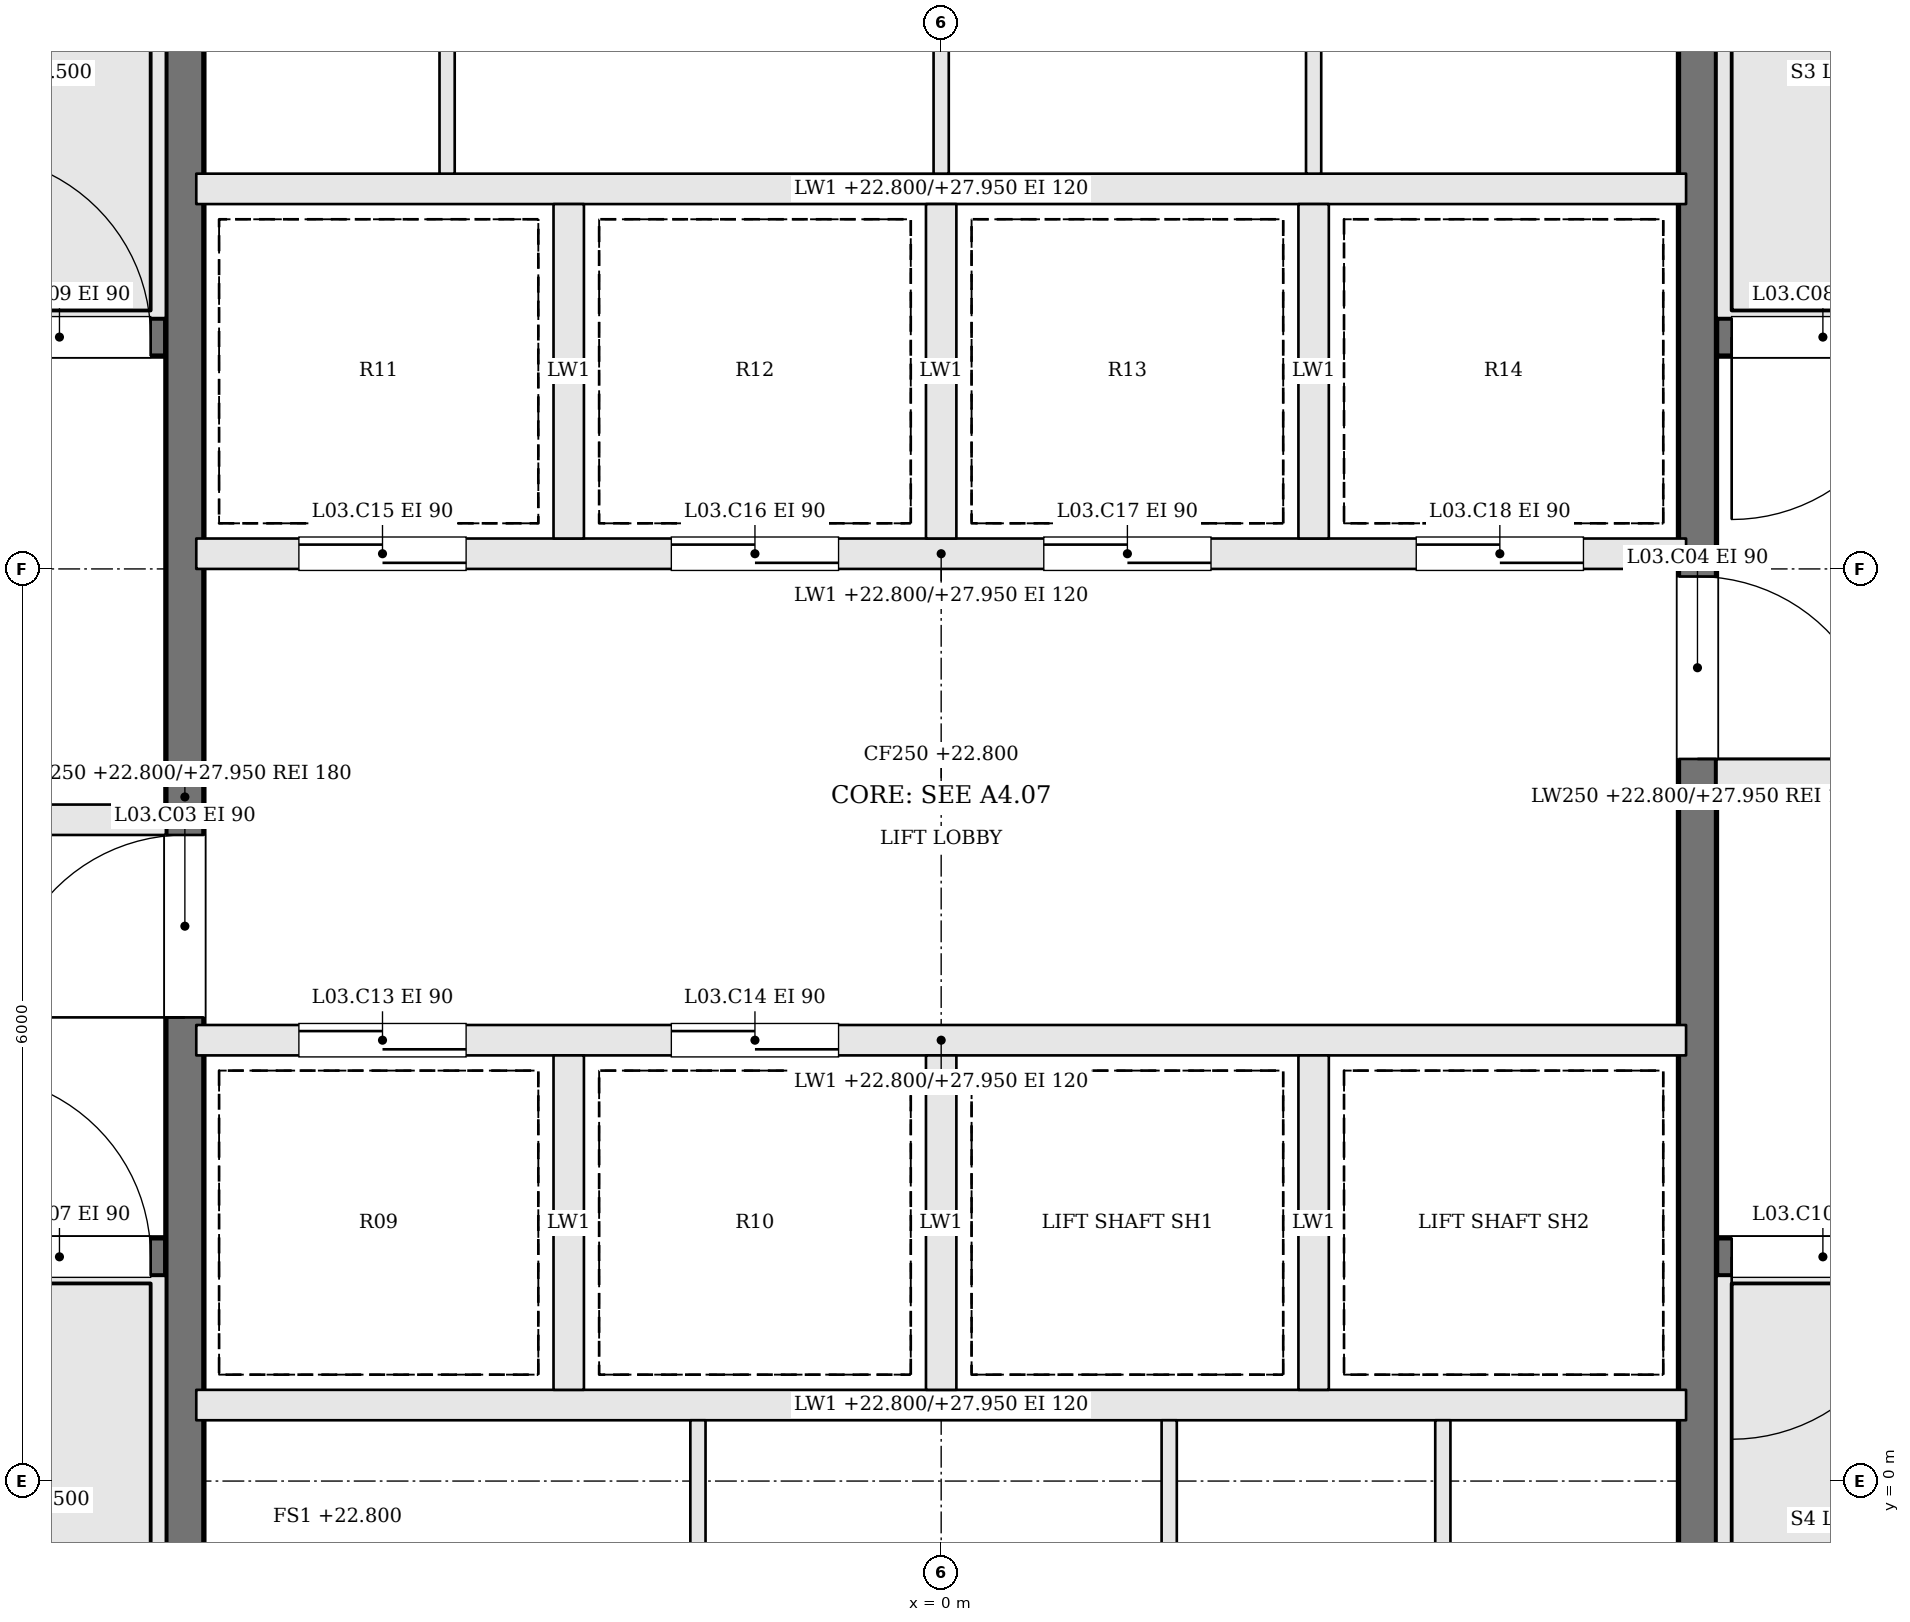
"""IFC4 building model, lengths in metres.
Left out: names, types, materials, properties, quantities, classifications, styles, units other than length and angle.
Written with IfcOpenShell. Run it as: python <this file> out.ifc"""

import sys

from ifc_helpers import new_model, si_unit, direction, frame, frame_2d, origin, place, context, subcontext, project, spatial, rectangle, extrude, element, fill, save


model = new_model("IFC4")
c1 = context("Model", 3, precision=1e-05, world=origin(), true_north=direction((0.0, 1.0)))
c2 = subcontext(c1, "Body", "Model", "MODEL_VIEW")
j1 = project(units=[si_unit("LENGTHUNIT", "METRE"), si_unit("PLANEANGLEUNIT", "RADIAN")], contexts=[c1])
p1 = place(None, origin())
s1 = spatial("IfcSite", under=j1, at=p1, CompositionType="ELEMENT")
p2 = place(p1, origin())
s2 = spatial("IfcBuilding", under=s1, at=p2, CompositionType="ELEMENT")
p3 = place(p2, frame((0.0, 0.0, 22.8)))
s3 = spatial("IfcBuildingStorey", under=s2, at=p3, CompositionType="ELEMENT", Elevation=22.8)
p4 = place(p3, frame((-11.6, 1.475, 0.0), z_axis=(0.0, 0.0, 1.0), x_axis=(1.0, 0.0, 0.0)))
e1 = element("IfcWall", 1, at=p4, inside=s3, PredefinedType="SOLIDWALL", context=c2, shape_type="SweptSolid", body=[
    extrude(rectangle(XDim=6.5, YDim=0.25, at=frame_2d((3.25, 0.0))), origin(), (0.0, 0.0, 1.0), 5.15),
])
p5 = place(p4, frame((5.2, 0.0, 0.0)))
e2 = element("IfcOpeningElement", 2, at=p5, cuts=e1, PredefinedType="OPENING", context=c2, shape_type="SweptSolid", body=[
    extrude(rectangle(XDim=1.2, YDim=2.1, at=frame_2d((0.6, 1.05))), frame((0.0, 0.135, 0.0), z_axis=(0.0, -1.0, 0.0), x_axis=(1.0, 0.0, 0.0)), (0.0, 0.0, 1.0), 0.27),
])
p6 = place(p3, frame((11.6, 7.525, 0.0), z_axis=(0.0, 0.0, 1.0), x_axis=(-1.0, 0.0, 0.0)))
e3 = element("IfcWall", 3, at=p6, inside=s3, PredefinedType="SOLIDWALL", context=c2, shape_type="SweptSolid", body=[
    extrude(rectangle(XDim=6.5, YDim=0.25, at=frame_2d((3.25, 0.0))), origin(), (0.0, 0.0, 1.0), 5.15),
])
p7 = place(p6, frame((5.2, 0.0, 0.0)))
e4 = element("IfcOpeningElement", 4, at=p7, cuts=e3, PredefinedType="OPENING", context=c2, shape_type="SweptSolid", body=[
    extrude(rectangle(XDim=1.2, YDim=2.1, at=frame_2d((0.6, 1.05))), frame((0.0, 0.135, 0.0), z_axis=(0.0, -1.0, 0.0), x_axis=(1.0, 0.0, 0.0)), (0.0, 0.0, 1.0), 0.27),
])
p8 = place(p3, frame((-11.6, 4.35, 0.0), z_axis=(0.0, 0.0, 1.0), x_axis=(1.0, 0.0, 0.0)))
e5 = element("IfcWall", 5, at=p8, inside=s3, PredefinedType="SOLIDWALL", context=c2, shape_type="SweptSolid", body=[
    extrude(rectangle(XDim=6.5, YDim=0.2, at=frame_2d((3.25, 0.0))), origin(), (0.0, 0.0, 1.0), 5.15),
])
p9 = place(p8, frame((3.8, 0.0, 0.0)))
e6 = element("IfcOpeningElement", 6, at=p9, cuts=e5, PredefinedType="OPENING", context=c2, shape_type="SweptSolid", body=[
    extrude(rectangle(XDim=1.2, YDim=2.1, at=frame_2d((0.6, 1.05))), frame((0.0, 0.11, 0.0), z_axis=(0.0, -1.0, 0.0), x_axis=(1.0, 0.0, 0.0)), (0.0, 0.0, 1.0), 0.22),
])
p10 = place(p8, frame((0.5, 0.0, 0.0)))
e7 = element("IfcOpeningElement", 7, at=p10, cuts=e5, PredefinedType="OPENING", context=c2, shape_type="SweptSolid", body=[
    extrude(rectangle(XDim=1.2, YDim=2.1, at=frame_2d((0.6, 1.05))), frame((0.0, 0.11, 0.0), z_axis=(0.0, -1.0, 0.0), x_axis=(1.0, 0.0, 0.0)), (0.0, 0.0, 1.0), 0.22),
])
p11 = place(p3, frame((11.6, 4.65, 0.0), z_axis=(0.0, 0.0, 1.0), x_axis=(-1.0, 0.0, 0.0)))
e8 = element("IfcWall", 8, at=p11, inside=s3, PredefinedType="SOLIDWALL", context=c2, shape_type="SweptSolid", body=[
    extrude(rectangle(XDim=6.5, YDim=0.2, at=frame_2d((3.25, 0.0))), origin(), (0.0, 0.0, 1.0), 5.15),
])
p12 = place(p11, frame((3.8, 0.0, 0.0)))
e9 = element("IfcOpeningElement", 9, at=p12, cuts=e8, PredefinedType="OPENING", context=c2, shape_type="SweptSolid", body=[
    extrude(rectangle(XDim=1.2, YDim=2.1, at=frame_2d((0.6, 1.05))), frame((0.0, 0.11, 0.0), z_axis=(0.0, -1.0, 0.0), x_axis=(1.0, 0.0, 0.0)), (0.0, 0.0, 1.0), 0.22),
])
p13 = place(p11, frame((0.5, 0.0, 0.0)))
e10 = element("IfcOpeningElement", 10, at=p13, cuts=e8, PredefinedType="OPENING", context=c2, shape_type="SweptSolid", body=[
    extrude(rectangle(XDim=1.2, YDim=2.1, at=frame_2d((0.6, 1.05))), frame((0.0, 0.11, 0.0), z_axis=(0.0, -1.0, 0.0), x_axis=(1.0, 0.0, 0.0)), (0.0, 0.0, 1.0), 0.22),
])
p14 = place(p3, frame((-11.6, 7.525, 0.0), z_axis=(0.0, 0.0, 1.0), x_axis=(1.0, 0.0, 0.0)))
e11 = element("IfcWall", 11, at=p14, inside=s3, PredefinedType="SOLIDWALL", context=c2, shape_type="SweptSolid", body=[
    extrude(rectangle(XDim=6.5, YDim=0.25, at=frame_2d((3.25, 0.0))), origin(), (0.0, 0.0, 1.0), 5.15),
])
p15 = place(p14, frame((5.2, 0.0, 0.0)))
e12 = element("IfcOpeningElement", 12, at=p15, cuts=e11, PredefinedType="OPENING", context=c2, shape_type="SweptSolid", body=[
    extrude(rectangle(XDim=1.2, YDim=2.1, at=frame_2d((0.6, 1.05))), frame((0.0, 0.135, 0.0), z_axis=(0.0, -1.0, 0.0), x_axis=(1.0, 0.0, 0.0)), (0.0, 0.0, 1.0), 0.27),
])
p16 = place(p3, frame((11.6, 1.475, 0.0), z_axis=(0.0, 0.0, 1.0), x_axis=(-1.0, 0.0, 0.0)))
e13 = element("IfcWall", 13, at=p16, inside=s3, PredefinedType="SOLIDWALL", context=c2, shape_type="SweptSolid", body=[
    extrude(rectangle(XDim=6.5, YDim=0.25, at=frame_2d((3.25, 0.0))), origin(), (0.0, 0.0, 1.0), 5.15),
])
p17 = place(p16, frame((5.2, 0.0, 0.0)))
e14 = element("IfcOpeningElement", 14, at=p17, cuts=e13, PredefinedType="OPENING", context=c2, shape_type="SweptSolid", body=[
    extrude(rectangle(XDim=1.2, YDim=2.1, at=frame_2d((0.6, 1.05))), frame((0.0, 0.135, 0.0), z_axis=(0.0, -1.0, 0.0), x_axis=(1.0, 0.0, 0.0)), (0.0, 0.0, 1.0), 0.27),
])
p18 = place(p3, frame((-4.975, -1.6, 0.0), z_axis=(0.0, 0.0, 1.0), x_axis=(0.0, 1.0, 0.0)))
e15 = element("IfcWall", 15, at=p18, inside=s3, PredefinedType="SOLIDWALL", context=c2, shape_type="SweptSolid", body=[
    extrude(rectangle(XDim=12.2, YDim=0.25, at=frame_2d((6.1, 0.0))), origin(), (0.0, 0.0, 1.0), 5.15),
])
p19 = place(p18, frame((4.65, 0.0, 0.0)))
e16 = element("IfcOpeningElement", 16, at=p19, cuts=e15, PredefinedType="OPENING", context=c2, shape_type="SweptSolid", body=[
    extrude(rectangle(XDim=1.2, YDim=2.1, at=frame_2d((0.6, 1.05))), frame((0.0, 0.135, 0.0), z_axis=(0.0, -1.0, 0.0), x_axis=(1.0, 0.0, 0.0)), (0.0, 0.0, 1.0), 0.27),
])
p20 = place(p3, frame((4.975, 10.6, 0.0), z_axis=(0.0, 0.0, 1.0), x_axis=(0.0, -1.0, 0.0)))
e17 = element("IfcWall", 17, at=p20, inside=s3, PredefinedType="SOLIDWALL", context=c2, shape_type="SweptSolid", body=[
    extrude(rectangle(XDim=12.2, YDim=0.25, at=frame_2d((6.1, 0.0))), origin(), (0.0, 0.0, 1.0), 5.15),
])
p21 = place(p20, frame((4.65, 0.0, 0.0)))
e18 = element("IfcOpeningElement", 18, at=p21, cuts=e17, PredefinedType="OPENING", context=c2, shape_type="SweptSolid", body=[
    extrude(rectangle(XDim=1.2, YDim=2.1, at=frame_2d((0.6, 1.05))), frame((0.0, 0.135, 0.0), z_axis=(0.0, -1.0, 0.0), x_axis=(1.0, 0.0, 0.0)), (0.0, 0.0, 1.0), 0.27),
])
p22 = place(p3, frame((-4.9, 0.5, 0.0), z_axis=(0.0, 0.0, 1.0), x_axis=(1.0, 0.0, 0.0)))
e19 = element("IfcWall", 19, at=p22, inside=s3, PredefinedType="SOLIDWALL", context=c2, shape_type="SweptSolid", body=[
    extrude(rectangle(XDim=9.8, YDim=0.2, at=frame_2d((4.9, 0.0))), origin(), (0.0, 0.0, 1.0), 5.15),
])
p23 = place(p3, frame((-4.9, 2.9, 0.0), z_axis=(0.0, 0.0, 1.0), x_axis=(1.0, 0.0, 0.0)))
e20 = element("IfcWall", 20, at=p23, inside=s3, PredefinedType="SOLIDWALL", context=c2, shape_type="SweptSolid", body=[
    extrude(rectangle(XDim=9.8, YDim=0.2, at=frame_2d((4.9, 0.0))), origin(), (0.0, 0.0, 1.0), 5.15),
])
p24 = place(p23, frame((0.675, 0.0, 0.0)))
e21 = element("IfcOpeningElement", 21, at=p24, cuts=e20, PredefinedType="OPENING", context=c2, shape_type="SweptSolid", body=[
    extrude(rectangle(XDim=1.1, YDim=2.1, at=frame_2d((0.55, 1.05))), frame((0.0, 0.11, 0.0), z_axis=(0.0, -1.0, 0.0), x_axis=(1.0, 0.0, 0.0)), (0.0, 0.0, 1.0), 0.22),
])
p25 = place(p23, frame((3.125, 0.0, 0.0)))
e22 = element("IfcOpeningElement", 22, at=p25, cuts=e20, PredefinedType="OPENING", context=c2, shape_type="SweptSolid", body=[
    extrude(rectangle(XDim=1.1, YDim=2.1, at=frame_2d((0.55, 1.05))), frame((0.0, 0.11, 0.0), z_axis=(0.0, -1.0, 0.0), x_axis=(1.0, 0.0, 0.0)), (0.0, 0.0, 1.0), 0.22),
])
p26 = place(p3, frame((-4.9, 6.1, 0.0), z_axis=(0.0, 0.0, 1.0), x_axis=(1.0, 0.0, 0.0)))
e23 = element("IfcWall", 23, at=p26, inside=s3, PredefinedType="SOLIDWALL", context=c2, shape_type="SweptSolid", body=[
    extrude(rectangle(XDim=9.8, YDim=0.2, at=frame_2d((4.9, 0.0))), origin(), (0.0, 0.0, 1.0), 5.15),
])
p27 = place(p26, frame((0.675, 0.0, 0.0)))
e24 = element("IfcOpeningElement", 24, at=p27, cuts=e23, PredefinedType="OPENING", context=c2, shape_type="SweptSolid", body=[
    extrude(rectangle(XDim=1.1, YDim=2.1, at=frame_2d((0.55, 1.05))), frame((0.0, 0.11, 0.0), z_axis=(0.0, -1.0, 0.0), x_axis=(1.0, 0.0, 0.0)), (0.0, 0.0, 1.0), 0.22),
])
p28 = place(p26, frame((3.125, 0.0, 0.0)))
e25 = element("IfcOpeningElement", 25, at=p28, cuts=e23, PredefinedType="OPENING", context=c2, shape_type="SweptSolid", body=[
    extrude(rectangle(XDim=1.1, YDim=2.1, at=frame_2d((0.55, 1.05))), frame((0.0, 0.11, 0.0), z_axis=(0.0, -1.0, 0.0), x_axis=(1.0, 0.0, 0.0)), (0.0, 0.0, 1.0), 0.22),
])
p29 = place(p26, frame((5.575, 0.0, 0.0)))
e26 = element("IfcOpeningElement", 26, at=p29, cuts=e23, PredefinedType="OPENING", context=c2, shape_type="SweptSolid", body=[
    extrude(rectangle(XDim=1.1, YDim=2.1, at=frame_2d((0.55, 1.05))), frame((0.0, 0.11, 0.0), z_axis=(0.0, -1.0, 0.0), x_axis=(1.0, 0.0, 0.0)), (0.0, 0.0, 1.0), 0.22),
])
p30 = place(p26, frame((8.025, 0.0, 0.0)))
e27 = element("IfcOpeningElement", 27, at=p30, cuts=e23, PredefinedType="OPENING", context=c2, shape_type="SweptSolid", body=[
    extrude(rectangle(XDim=1.1, YDim=2.1, at=frame_2d((0.55, 1.05))), frame((0.0, 0.11, 0.0), z_axis=(0.0, -1.0, 0.0), x_axis=(1.0, 0.0, 0.0)), (0.0, 0.0, 1.0), 0.22),
])
p31 = place(p3, frame((-4.9, 8.5, 0.0), z_axis=(0.0, 0.0, 1.0), x_axis=(1.0, 0.0, 0.0)))
e28 = element("IfcWall", 28, at=p31, inside=s3, PredefinedType="SOLIDWALL", context=c2, shape_type="SweptSolid", body=[
    extrude(rectangle(XDim=9.8, YDim=0.2, at=frame_2d((4.9, 0.0))), origin(), (0.0, 0.0, 1.0), 5.15),
])
for number, where, z_axis, x_axis in (
    (29, (-2.45, 0.6, 0.0), (0.0, 0.0, 1.0), (0.0, 1.0, 0.0)),
    (30, (0.0, 0.6, 0.0), (0.0, 0.0, 1.0), (0.0, 1.0, 0.0)),
    (31, (2.45, 0.6, 0.0), (0.0, 0.0, 1.0), (0.0, 1.0, 0.0)),
    (32, (-2.45, 6.2, 0.0), (0.0, 0.0, 1.0), (0.0, 1.0, 0.0)),
    (33, (0.0, 6.2, 0.0), (0.0, 0.0, 1.0), (0.0, 1.0, 0.0)),
    (34, (2.45, 6.2, 0.0), (0.0, 0.0, 1.0), (0.0, 1.0, 0.0)),
):
    element("IfcWall", number, at=place(p3, frame(where, z_axis=z_axis, x_axis=x_axis)), inside=s3, PredefinedType="SOLIDWALL", context=c2, shape_type="SweptSolid", body=[
        extrude(rectangle(XDim=2.2, YDim=0.2, at=frame_2d((1.1, 0.0))), origin(), (0.0, 0.0, 1.0), 5.15),
    ])
for number, where, z_axis, x_axis in (
    (35, (-1.6, -1.6, 0.0), (0.0, 0.0, 1.0), (0.0, 1.0, 0.0)),
    (36, (1.5, -1.6, 0.0), (0.0, 0.0, 1.0), (0.0, 1.0, 0.0)),
    (37, (3.3, -1.6, 0.0), (0.0, 0.0, 1.0), (0.0, 1.0, 0.0)),
    (38, (-3.25, 8.6, 0.0), (0.0, 0.0, 1.0), (0.0, 1.0, 0.0)),
    (39, (0.0, 8.6, 0.0), (0.0, 0.0, 1.0), (0.0, 1.0, 0.0)),
    (40, (2.45, 8.6, 0.0), (0.0, 0.0, 1.0), (0.0, 1.0, 0.0)),
):
    element("IfcWall", number, at=place(p3, frame(where, z_axis=z_axis, x_axis=x_axis)), inside=s3, PredefinedType="PARTITIONING", context=c2, shape_type="SweptSolid", body=[
        extrude(rectangle(XDim=2.0, YDim=0.1, at=frame_2d((1.0, 0.0))), origin(), (0.0, 0.0, 1.0), 5.15),
    ])
p32 = place(p19, origin())
e41 = element("IfcDoor", 41, at=p32, inside=s3, OperationType="SINGLE_SWING_LEFT", PredefinedType="DOOR", context=c2, shape_type="SweptSolid", body=[
    extrude(rectangle(XDim=1.2, YDim=2.1, at=frame_2d((0.6, 1.05))), frame((0.0, 0.025, 0.0), z_axis=(0.0, -1.0, 0.0), x_axis=(1.0, 0.0, 0.0)), (0.0, 0.0, 1.0), 0.05),
])
fill(e16, e41)
p33 = place(p21, origin())
e42 = element("IfcDoor", 42, at=p33, inside=s3, OperationType="SINGLE_SWING_RIGHT", PredefinedType="DOOR", context=c2, shape_type="SweptSolid", body=[
    extrude(rectangle(XDim=1.2, YDim=2.1, at=frame_2d((0.6, 1.05))), frame((0.0, 0.025, 0.0), z_axis=(0.0, -1.0, 0.0), x_axis=(1.0, 0.0, 0.0)), (0.0, 0.0, 1.0), 0.05),
])
fill(e18, e42)
p34 = place(p5, origin())
e43 = element("IfcDoor", 43, at=p34, inside=s3, OperationType="SINGLE_SWING_LEFT", PredefinedType="DOOR", context=c2, shape_type="SweptSolid", body=[
    extrude(rectangle(XDim=1.2, YDim=2.1, at=frame_2d((0.6, 1.05))), frame((0.0, 0.025, 0.0), z_axis=(0.0, -1.0, 0.0), x_axis=(1.0, 0.0, 0.0)), (0.0, 0.0, 1.0), 0.05),
])
fill(e2, e43)
p35 = place(p7, origin())
e44 = element("IfcDoor", 44, at=p35, inside=s3, OperationType="SINGLE_SWING_RIGHT", PredefinedType="DOOR", context=c2, shape_type="SweptSolid", body=[
    extrude(rectangle(XDim=1.2, YDim=2.1, at=frame_2d((0.6, 1.05))), frame((0.0, 0.025, 0.0), z_axis=(0.0, -1.0, 0.0), x_axis=(1.0, 0.0, 0.0)), (0.0, 0.0, 1.0), 0.05),
])
fill(e4, e44)
p36 = place(p15, origin())
e45 = element("IfcDoor", 45, at=p36, inside=s3, OperationType="SINGLE_SWING_LEFT", PredefinedType="DOOR", context=c2, shape_type="SweptSolid", body=[
    extrude(rectangle(XDim=1.2, YDim=2.1, at=frame_2d((0.6, 1.05))), frame((0.0, 0.025, 0.0), z_axis=(0.0, -1.0, 0.0), x_axis=(1.0, 0.0, 0.0)), (0.0, 0.0, 1.0), 0.05),
])
fill(e12, e45)
p37 = place(p17, origin())
e46 = element("IfcDoor", 46, at=p37, inside=s3, OperationType="SINGLE_SWING_RIGHT", PredefinedType="DOOR", context=c2, shape_type="SweptSolid", body=[
    extrude(rectangle(XDim=1.2, YDim=2.1, at=frame_2d((0.6, 1.05))), frame((0.0, 0.025, 0.0), z_axis=(0.0, -1.0, 0.0), x_axis=(1.0, 0.0, 0.0)), (0.0, 0.0, 1.0), 0.05),
])
fill(e14, e46)
p38 = place(p24, origin())
e47 = element("IfcDoor", 47, at=p38, inside=s3, OperationType="SLIDING_TO_RIGHT", PredefinedType="DOOR", context=c2, shape_type="SweptSolid", body=[
    extrude(rectangle(XDim=1.1, YDim=2.1, at=frame_2d((0.55, 1.05))), frame((0.0, 0.025, 0.0), z_axis=(0.0, -1.0, 0.0), x_axis=(1.0, 0.0, 0.0)), (0.0, 0.0, 1.0), 0.05),
])
fill(e21, e47)
p39 = place(p25, origin())
e48 = element("IfcDoor", 48, at=p39, inside=s3, OperationType="SLIDING_TO_LEFT", PredefinedType="DOOR", context=c2, shape_type="SweptSolid", body=[
    extrude(rectangle(XDim=1.1, YDim=2.1, at=frame_2d((0.55, 1.05))), frame((0.0, 0.025, 0.0), z_axis=(0.0, -1.0, 0.0), x_axis=(1.0, 0.0, 0.0)), (0.0, 0.0, 1.0), 0.05),
])
fill(e22, e48)
p40 = place(p27, origin())
e49 = element("IfcDoor", 49, at=p40, inside=s3, OperationType="SLIDING_TO_RIGHT", PredefinedType="DOOR", context=c2, shape_type="SweptSolid", body=[
    extrude(rectangle(XDim=1.1, YDim=2.1, at=frame_2d((0.55, 1.05))), frame((0.0, 0.025, 0.0), z_axis=(0.0, -1.0, 0.0), x_axis=(1.0, 0.0, 0.0)), (0.0, 0.0, 1.0), 0.05),
])
fill(e24, e49)
p41 = place(p28, origin())
e50 = element("IfcDoor", 50, at=p41, inside=s3, OperationType="SLIDING_TO_LEFT", PredefinedType="DOOR", context=c2, shape_type="SweptSolid", body=[
    extrude(rectangle(XDim=1.1, YDim=2.1, at=frame_2d((0.55, 1.05))), frame((0.0, 0.025, 0.0), z_axis=(0.0, -1.0, 0.0), x_axis=(1.0, 0.0, 0.0)), (0.0, 0.0, 1.0), 0.05),
])
fill(e25, e50)
p42 = place(p29, origin())
e51 = element("IfcDoor", 51, at=p42, inside=s3, OperationType="SLIDING_TO_RIGHT", PredefinedType="DOOR", context=c2, shape_type="SweptSolid", body=[
    extrude(rectangle(XDim=1.1, YDim=2.1, at=frame_2d((0.55, 1.05))), frame((0.0, 0.025, 0.0), z_axis=(0.0, -1.0, 0.0), x_axis=(1.0, 0.0, 0.0)), (0.0, 0.0, 1.0), 0.05),
])
fill(e26, e51)
p43 = place(p30, origin())
e52 = element("IfcDoor", 52, at=p43, inside=s3, OperationType="SLIDING_TO_LEFT", PredefinedType="DOOR", context=c2, shape_type="SweptSolid", body=[
    extrude(rectangle(XDim=1.1, YDim=2.1, at=frame_2d((0.55, 1.05))), frame((0.0, 0.025, 0.0), z_axis=(0.0, -1.0, 0.0), x_axis=(1.0, 0.0, 0.0)), (0.0, 0.0, 1.0), 0.05),
])
fill(e27, e52)
save(model, sys.argv[1])
